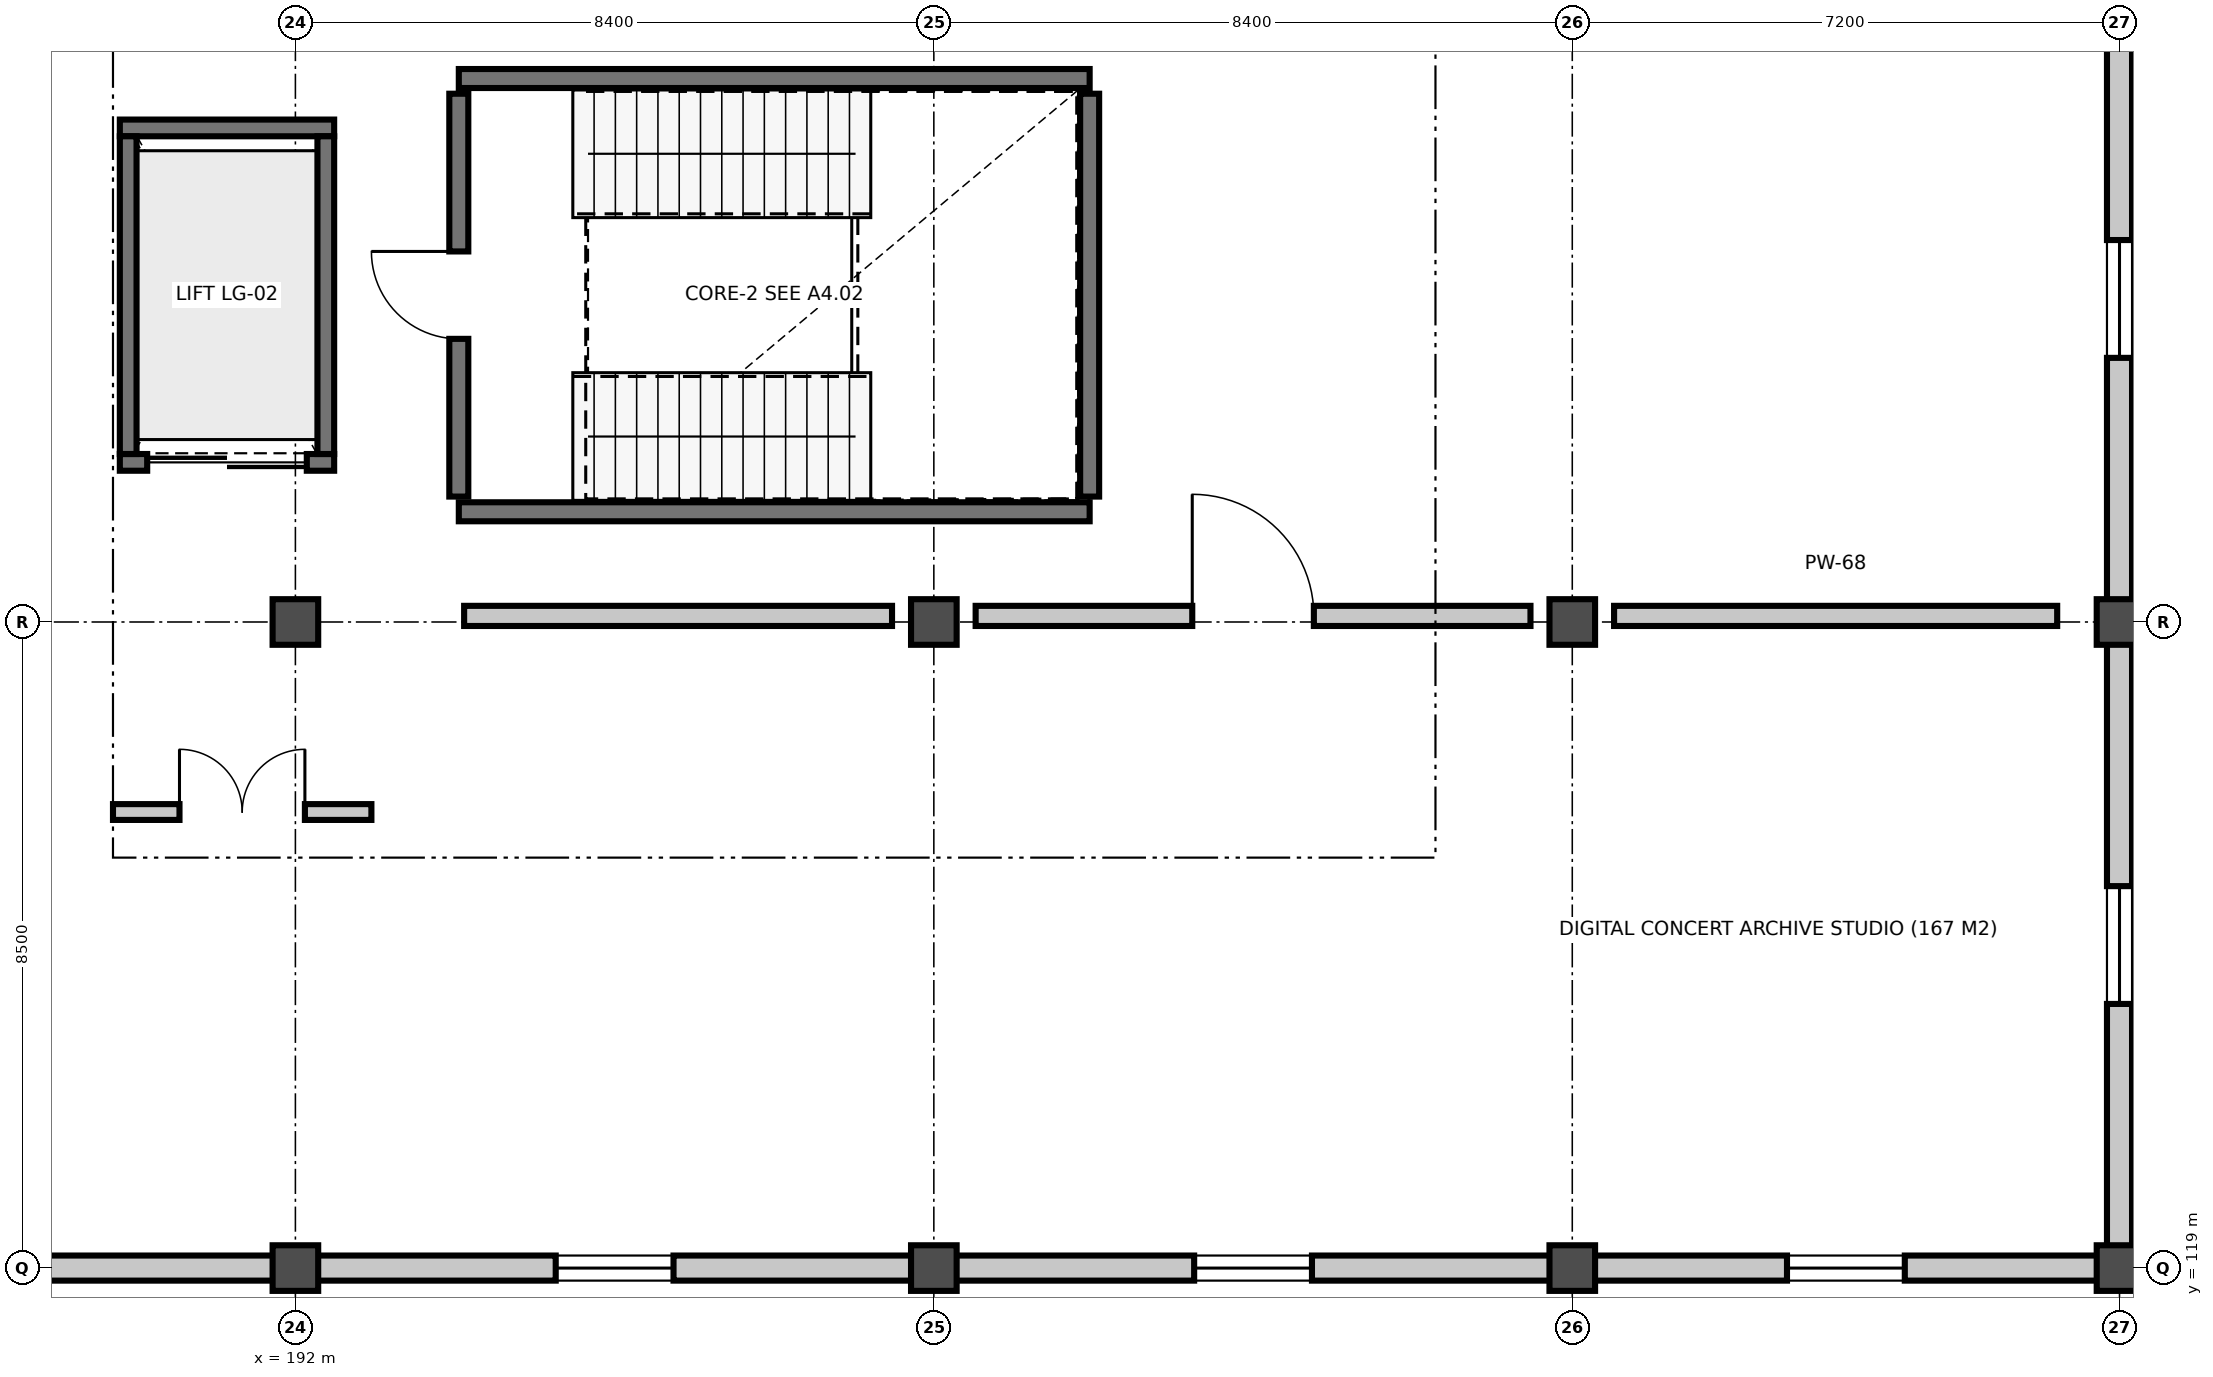
"""IFC4 building model, lengths in metres.
Left out: names, types, materials, properties, quantities, classifications, styles, units other than length and angle.
Written with IfcOpenShell. Run it as: python <this file> out.ifc"""

import sys

from ifc_helpers import new_model, si_unit, direction, frame, frame_2d, origin, origin_2d, place, context, subcontext, project, spatial, rectangle, extrude, element, fill, save


model = new_model("IFC4")
c1 = context("Model", 3, precision=1e-05, world=origin(), true_north=direction((0.0, 1.0)))
c2 = subcontext(c1, "Body", "Model", "MODEL_VIEW")
j1 = project(units=[si_unit("LENGTHUNIT", "METRE"), si_unit("PLANEANGLEUNIT", "RADIAN")], contexts=[c1])
p1 = place(None, origin())
s1 = spatial("IfcSite", under=j1, at=p1, CompositionType="ELEMENT")
p2 = place(p1, origin())
s2 = spatial("IfcBuilding", under=s1, at=p2, CompositionType="ELEMENT")
p3 = place(p2, frame((0.0, 0.0, 15.0)))
s3 = spatial("IfcBuildingStorey", under=s2, at=p3, CompositionType="ELEMENT", Elevation=15.0)
for number, where, z_axis, x_axis in (
    (1, (192.0, 119.0, 0.0), (0.0, 0.0, 1.0), (1.0, 0.0, 0.0)),
    (2, (192.0, 127.5, 0.0), (0.0, 0.0, 1.0), (1.0, 0.0, 0.0)),
    (3, (200.4, 119.0, 0.0), (0.0, 0.0, 1.0), (1.0, 0.0, 0.0)),
    (4, (200.4, 127.5, 0.0), (0.0, 0.0, 1.0), (1.0, 0.0, 0.0)),
    (5, (208.8, 119.0, 0.0), (0.0, 0.0, 1.0), (1.0, 0.0, 0.0)),
    (6, (208.8, 127.5, 0.0), (0.0, 0.0, 1.0), (1.0, 0.0, 0.0)),
    (7, (216.0, 119.0, 0.0), (0.0, 0.0, 1.0), (1.0, 0.0, 0.0)),
    (8, (216.0, 127.5, 0.0), (0.0, 0.0, 1.0), (1.0, 0.0, 0.0)),
):
    element("IfcColumn", number, at=place(p3, frame(where, z_axis=z_axis, x_axis=x_axis)), inside=s3, PredefinedType="COLUMN", context=c2, shape_type="SweptSolid", body=[
        extrude(rectangle(XDim=0.6, YDim=0.6, at=origin_2d()), origin(), (0.0, 0.0, 1.0), 4.5),
    ])
p4 = place(p3, frame((216.0, 127.22, 0.0), z_axis=(0.0, 0.0, 1.0), x_axis=(0.0, -1.0, 0.0)))
e9 = element("IfcWall", 9, at=p4, inside=s3, PredefinedType="SOLIDWALL", context=c2, shape_type="SweptSolid", body=[
    extrude(rectangle(XDim=7.94, YDim=0.33, at=frame_2d((3.97, 0.0))), origin(), (0.0, 0.0, 1.0), 3.515),
])
p5 = place(p4, frame((3.195, 0.0, 1.0)))
e10 = element("IfcOpeningElement", 10, at=p5, cuts=e9, PredefinedType="OPENING", context=c2, shape_type="SweptSolid", body=[
    extrude(rectangle(XDim=1.55, YDim=1.85, at=frame_2d((0.775, 0.925))), frame((0.0, 0.175, 0.0), z_axis=(0.0, -1.0, 0.0), x_axis=(1.0, 0.0, 0.0)), (0.0, 0.0, 1.0), 0.35),
])
p6 = place(p3, frame((216.0, 135.72, 0.0), z_axis=(0.0, 0.0, 1.0), x_axis=(0.0, -1.0, 0.0)))
e11 = element("IfcWall", 11, at=p6, inside=s3, PredefinedType="SOLIDWALL", context=c2, shape_type="SweptSolid", body=[
    extrude(rectangle(XDim=7.94, YDim=0.33, at=frame_2d((3.97, 0.0))), origin(), (0.0, 0.0, 1.0), 3.371),
])
p7 = place(p6, frame((3.195, 0.0, 1.0)))
e12 = element("IfcOpeningElement", 12, at=p7, cuts=e11, PredefinedType="OPENING", context=c2, shape_type="SweptSolid", body=[
    extrude(rectangle(XDim=1.55, YDim=1.85, at=frame_2d((0.775, 0.925))), frame((0.0, 0.175, 0.0), z_axis=(0.0, -1.0, 0.0), x_axis=(1.0, 0.0, 0.0)), (0.0, 0.0, 1.0), 0.35),
])
p8 = place(p3, frame((191.72, 119.0, 0.0), z_axis=(0.0, 0.0, 1.0), x_axis=(-1.0, 0.0, 0.0)))
e13 = element("IfcWall", 13, at=p8, inside=s3, PredefinedType="SOLIDWALL", context=c2, shape_type="SweptSolid", body=[
    extrude(rectangle(XDim=7.84, YDim=0.33, at=frame_2d((3.92, 0.0))), origin(), (0.0, 0.0, 1.0), 3.371),
])
p9 = place(p8, frame((3.145, 0.0, 1.0)))
e14 = element("IfcOpeningElement", 14, at=p9, cuts=e13, PredefinedType="OPENING", context=c2, shape_type="SweptSolid", body=[
    extrude(rectangle(XDim=1.55, YDim=1.85, at=frame_2d((0.775, 0.925))), frame((0.0, 0.175, 0.0), z_axis=(0.0, -1.0, 0.0), x_axis=(1.0, 0.0, 0.0)), (0.0, 0.0, 1.0), 0.35),
])
p10 = place(p3, frame((200.12, 119.0, 0.0), z_axis=(0.0, 0.0, 1.0), x_axis=(-1.0, 0.0, 0.0)))
e15 = element("IfcWall", 15, at=p10, inside=s3, PredefinedType="SOLIDWALL", context=c2, shape_type="SweptSolid", body=[
    extrude(rectangle(XDim=7.84, YDim=0.33, at=frame_2d((3.92, 0.0))), origin(), (0.0, 0.0, 1.0), 3.294),
])
p11 = place(p10, frame((3.145, 0.0, 1.0)))
e16 = element("IfcOpeningElement", 16, at=p11, cuts=e15, PredefinedType="OPENING", context=c2, shape_type="SweptSolid", body=[
    extrude(rectangle(XDim=1.55, YDim=1.85, at=frame_2d((0.775, 0.925))), frame((0.0, 0.175, 0.0), z_axis=(0.0, -1.0, 0.0), x_axis=(1.0, 0.0, 0.0)), (0.0, 0.0, 1.0), 0.35),
])
p12 = place(p3, frame((208.52, 119.0, 0.0), z_axis=(0.0, 0.0, 1.0), x_axis=(-1.0, 0.0, 0.0)))
e17 = element("IfcWall", 17, at=p12, inside=s3, PredefinedType="SOLIDWALL", context=c2, shape_type="SweptSolid", body=[
    extrude(rectangle(XDim=7.84, YDim=0.33, at=frame_2d((3.92, 0.0))), origin(), (0.0, 0.0, 1.0), 3.205),
])
p13 = place(p12, frame((3.145, 0.0, 1.0)))
e18 = element("IfcOpeningElement", 18, at=p13, cuts=e17, PredefinedType="OPENING", context=c2, shape_type="SweptSolid", body=[
    extrude(rectangle(XDim=1.55, YDim=1.85, at=frame_2d((0.775, 0.925))), frame((0.0, 0.175, 0.0), z_axis=(0.0, -1.0, 0.0), x_axis=(1.0, 0.0, 0.0)), (0.0, 0.0, 1.0), 0.35),
])
p14 = place(p3, frame((215.72, 119.0, 0.0), z_axis=(0.0, 0.0, 1.0), x_axis=(-1.0, 0.0, 0.0)))
e19 = element("IfcWall", 19, at=p14, inside=s3, PredefinedType="SOLIDWALL", context=c2, shape_type="SweptSolid", body=[
    extrude(rectangle(XDim=6.64, YDim=0.33, at=frame_2d((3.32, 0.0))), origin(), (0.0, 0.0, 1.0), 3.137),
])
p15 = place(p14, frame((2.545, 0.0, 1.0)))
e20 = element("IfcOpeningElement", 20, at=p15, cuts=e19, PredefinedType="OPENING", context=c2, shape_type="SweptSolid", body=[
    extrude(rectangle(XDim=1.55, YDim=1.85, at=frame_2d((0.775, 0.925))), frame((0.0, 0.175, 0.0), z_axis=(0.0, -1.0, 0.0), x_axis=(1.0, 0.0, 0.0)), (0.0, 0.0, 1.0), 0.35),
])
for number, where, z_axis, x_axis in (
    (21, (202.45, 128.95, 0.0), (0.0, 0.0, 1.0), (-1.0, 0.0, 0.0)),
    (22, (194.15, 134.65, 0.0), (0.0, 0.0, 1.0), (1.0, 0.0, 0.0)),
):
    element("IfcWall", number, at=place(p3, frame(where, z_axis=z_axis, x_axis=x_axis)), inside=s3, PredefinedType="SHEAR", context=c2, shape_type="SweptSolid", body=[
        extrude(rectangle(XDim=8.3, YDim=0.25, at=frame_2d((4.15, 0.0))), origin(), (0.0, 0.0, 1.0), 4.21),
    ])
p16 = place(p3, frame((194.15, 129.15, 0.0), z_axis=(0.0, 0.0, 1.0), x_axis=(0.0, 1.0, 0.0)))
e23 = element("IfcWall", 23, at=p16, inside=s3, PredefinedType="SHEAR", context=c2, shape_type="SweptSolid", body=[
    extrude(rectangle(XDim=5.3, YDim=0.25, at=frame_2d((2.65, 0.0))), origin(), (0.0, 0.0, 1.0), 4.21),
])
p17 = place(p16, frame((2.075, 0.0, 0.0)))
e24 = element("IfcOpeningElement", 24, at=p17, cuts=e23, PredefinedType="OPENING", context=c2, shape_type="SweptSolid", body=[
    extrude(rectangle(XDim=1.15, YDim=2.18, at=frame_2d((0.575, 1.09))), frame((0.0, 0.135, 0.0), z_axis=(0.0, -1.0, 0.0), x_axis=(1.0, 0.0, 0.0)), (0.0, 0.0, 1.0), 0.27),
])
p18 = place(p3, frame((202.45, 134.45, 0.0), z_axis=(0.0, 0.0, 1.0), x_axis=(0.0, -1.0, 0.0)))
e25 = element("IfcWall", 25, at=p18, inside=s3, PredefinedType="SHEAR", context=c2, shape_type="SweptSolid", body=[
    extrude(rectangle(XDim=5.3, YDim=0.25, at=frame_2d((2.65, 0.0))), origin(), (0.0, 0.0, 1.0), 4.21),
])
p19 = place(p3, frame((189.69, 129.6, 0.0), z_axis=(0.0, 0.0, 1.0), x_axis=(1.0, 0.0, 0.0)))
e26 = element("IfcWall", 26, at=p19, inside=s3, PredefinedType="SHEAR", context=c2, shape_type="SweptSolid", body=[
    extrude(rectangle(XDim=2.82, YDim=0.22, at=frame_2d((1.41, 0.0))), origin(), (0.0, 0.0, 1.0), 3.164),
])
p20 = place(p19, frame((0.36, 0.0, 0.0)))
e27 = element("IfcOpeningElement", 27, at=p20, cuts=e26, PredefinedType="OPENING", context=c2, shape_type="SweptSolid", body=[
    extrude(rectangle(XDim=2.1, YDim=2.45, at=frame_2d((1.05, 1.225))), frame((0.0, 0.12, 0.0), z_axis=(0.0, -1.0, 0.0), x_axis=(1.0, 0.0, 0.0)), (0.0, 0.0, 1.0), 0.24),
])
p21 = place(p3, frame((189.69, 134.0, 0.0), z_axis=(0.0, 0.0, 1.0), x_axis=(1.0, 0.0, 0.0)))
e28 = element("IfcWall", 28, at=p21, inside=s3, PredefinedType="SHEAR", context=c2, shape_type="SweptSolid", body=[
    extrude(rectangle(XDim=2.82, YDim=0.22, at=frame_2d((1.41, 0.0))), origin(), (0.0, 0.0, 1.0), 3.164),
])
p22 = place(p3, frame((189.8, 129.71, 0.0), z_axis=(0.0, 0.0, 1.0), x_axis=(0.0, 1.0, 0.0)))
e29 = element("IfcWall", 29, at=p22, inside=s3, PredefinedType="SHEAR", context=c2, shape_type="SweptSolid", body=[
    extrude(rectangle(XDim=4.18, YDim=0.22, at=frame_2d((2.09, 0.0))), origin(), (0.0, 0.0, 1.0), 4.21),
])
p23 = place(p3, frame((192.4, 129.71, 0.0), z_axis=(0.0, 0.0, 1.0), x_axis=(0.0, 1.0, 0.0)))
e30 = element("IfcWall", 30, at=p23, inside=s3, PredefinedType="SHEAR", context=c2, shape_type="SweptSolid", body=[
    extrude(rectangle(XDim=4.18, YDim=0.22, at=frame_2d((2.09, 0.0))), origin(), (0.0, 0.0, 1.0), 3.164),
])
p24 = place(p3, frame((189.6, 125.0, 0.0), z_axis=(0.0, 0.0, 1.0), x_axis=(1.0, 0.0, 0.0)))
e31 = element("IfcWall", 31, at=p24, inside=s3, PredefinedType="PARTITIONING", context=c2, shape_type="SweptSolid", body=[
    extrude(rectangle(XDim=3.4, YDim=0.208, at=frame_2d((1.7, 0.0))), origin(), (0.0, 0.0, 1.0), 3.038),
])
p25 = place(p24, frame((0.875, 0.0, 0.0)))
e32 = element("IfcOpeningElement", 32, at=p25, cuts=e31, PredefinedType="OPENING", context=c2, shape_type="SweptSolid", body=[
    extrude(rectangle(XDim=1.65, YDim=2.2, at=frame_2d((0.825, 1.1))), frame((0.0, 0.114, 0.0), z_axis=(0.0, -1.0, 0.0), x_axis=(1.0, 0.0, 0.0)), (0.0, 0.0, 1.0), 0.228),
])
p26 = place(p3, frame((194.22, 127.58, 0.0), z_axis=(0.0, 0.0, 1.0), x_axis=(1.0, 0.0, 0.0)))
e33 = element("IfcWall", 33, at=p26, inside=s3, PredefinedType="PARTITIONING", context=c2, shape_type="SweptSolid", body=[
    extrude(rectangle(XDim=5.63, YDim=0.265, at=frame_2d((2.815, 0.0))), origin(), (0.0, 0.0, 1.0), 3.13),
])
p27 = place(p3, frame((200.95, 127.58, 0.0), z_axis=(0.0, 0.0, 1.0), x_axis=(1.0, 0.0, 0.0)))
e34 = element("IfcWall", 34, at=p27, inside=s3, PredefinedType="PARTITIONING", context=c2, shape_type="SweptSolid", body=[
    extrude(rectangle(XDim=7.3, YDim=0.265, at=frame_2d((3.65, 0.0))), origin(), (0.0, 0.0, 1.0), 3.13),
])
p28 = place(p27, frame((2.85, 0.0, 0.0)))
e35 = element("IfcOpeningElement", 35, at=p28, cuts=e34, PredefinedType="OPENING", context=c2, shape_type="SweptSolid", body=[
    extrude(rectangle(XDim=1.6, YDim=2.3, at=frame_2d((0.8, 1.15))), frame((0.0, 0.142, 0.0), z_axis=(0.0, -1.0, 0.0), x_axis=(1.0, 0.0, 0.0)), (0.0, 0.0, 1.0), 0.285),
])
p29 = place(p3, frame((209.35, 127.58, 0.0), z_axis=(0.0, 0.0, 1.0), x_axis=(1.0, 0.0, 0.0)))
e36 = element("IfcWall", 36, at=p29, inside=s3, PredefinedType="PARTITIONING", context=c2, shape_type="SweptSolid", body=[
    extrude(rectangle(XDim=5.83, YDim=0.265, at=frame_2d((2.915, 0.0))), origin(), (0.0, 0.0, 1.0), 3.038),
])
p30 = place(p5, origin())
e37 = element("IfcWindow", 37, at=p30, inside=s3, PartitioningType="SINGLE_PANEL", PredefinedType="WINDOW", context=c2, shape_type="SweptSolid", body=[
    extrude(rectangle(XDim=1.55, YDim=1.85, at=frame_2d((0.775, 0.925))), frame((0.0, 0.03, 0.0), z_axis=(0.0, -1.0, 0.0), x_axis=(1.0, 0.0, 0.0)), (0.0, 0.0, 1.0), 0.06),
])
fill(e10, e37)
p31 = place(p7, origin())
e38 = element("IfcWindow", 38, at=p31, inside=s3, PartitioningType="SINGLE_PANEL", PredefinedType="WINDOW", context=c2, shape_type="SweptSolid", body=[
    extrude(rectangle(XDim=1.55, YDim=1.85, at=frame_2d((0.775, 0.925))), frame((0.0, 0.03, 0.0), z_axis=(0.0, -1.0, 0.0), x_axis=(1.0, 0.0, 0.0)), (0.0, 0.0, 1.0), 0.06),
])
fill(e12, e38)
p32 = place(p11, origin())
e39 = element("IfcWindow", 39, at=p32, inside=s3, PartitioningType="SINGLE_PANEL", PredefinedType="WINDOW", context=c2, shape_type="SweptSolid", body=[
    extrude(rectangle(XDim=1.55, YDim=1.85, at=frame_2d((0.775, 0.925))), frame((0.0, 0.03, 0.0), z_axis=(0.0, -1.0, 0.0), x_axis=(1.0, 0.0, 0.0)), (0.0, 0.0, 1.0), 0.06),
])
fill(e16, e39)
p33 = place(p13, origin())
e40 = element("IfcWindow", 40, at=p33, inside=s3, PartitioningType="SINGLE_PANEL", PredefinedType="WINDOW", context=c2, shape_type="SweptSolid", body=[
    extrude(rectangle(XDim=1.55, YDim=1.85, at=frame_2d((0.775, 0.925))), frame((0.0, 0.03, 0.0), z_axis=(0.0, -1.0, 0.0), x_axis=(1.0, 0.0, 0.0)), (0.0, 0.0, 1.0), 0.06),
])
fill(e18, e40)
p34 = place(p15, origin())
e41 = element("IfcWindow", 41, at=p34, inside=s3, PartitioningType="SINGLE_PANEL", PredefinedType="WINDOW", context=c2, shape_type="SweptSolid", body=[
    extrude(rectangle(XDim=1.55, YDim=1.85, at=frame_2d((0.775, 0.925))), frame((0.0, 0.03, 0.0), z_axis=(0.0, -1.0, 0.0), x_axis=(1.0, 0.0, 0.0)), (0.0, 0.0, 1.0), 0.06),
])
fill(e20, e41)
p35 = place(p17, origin())
e42 = element("IfcDoor", 42, at=p35, inside=s3, OperationType="SINGLE_SWING_RIGHT", PredefinedType="DOOR", context=c2, shape_type="SweptSolid", body=[
    extrude(rectangle(XDim=1.15, YDim=2.18, at=frame_2d((0.575, 1.09))), frame((0.0, 0.025, 0.0), z_axis=(0.0, -1.0, 0.0), x_axis=(1.0, 0.0, 0.0)), (0.0, 0.0, 1.0), 0.05),
])
fill(e24, e42)
p36 = place(p20, origin())
e43 = element("IfcDoor", 43, at=p36, inside=s3, OperationType="DOUBLE_DOOR_SLIDING", PredefinedType="DOOR", context=c2, shape_type="SweptSolid", body=[
    extrude(rectangle(XDim=2.1, YDim=2.45, at=frame_2d((1.05, 1.225))), frame((0.0, 0.025, 0.0), z_axis=(0.0, -1.0, 0.0), x_axis=(1.0, 0.0, 0.0)), (0.0, 0.0, 1.0), 0.05),
])
fill(e27, e43)
p37 = place(p25, origin())
e44 = element("IfcDoor", 44, at=p37, inside=s3, OperationType="DOUBLE_DOOR_SINGLE_SWING", PredefinedType="DOOR", context=c2, shape_type="SweptSolid", body=[
    extrude(rectangle(XDim=1.65, YDim=2.2, at=frame_2d((0.825, 1.1))), frame((0.0, 0.025, 0.0), z_axis=(0.0, -1.0, 0.0), x_axis=(1.0, 0.0, 0.0)), (0.0, 0.0, 1.0), 0.05),
])
fill(e32, e44)
p38 = place(p28, origin())
e45 = element("IfcDoor", 45, at=p38, inside=s3, OperationType="SINGLE_SWING_LEFT", PredefinedType="DOOR", context=c2, shape_type="SweptSolid", body=[
    extrude(rectangle(XDim=1.6, YDim=2.3, at=frame_2d((0.8, 1.15))), frame((0.0, 0.025, 0.0), z_axis=(0.0, -1.0, 0.0), x_axis=(1.0, 0.0, 0.0)), (0.0, 0.0, 1.0), 0.05),
])
fill(e35, e45)
save(model, sys.argv[1])
